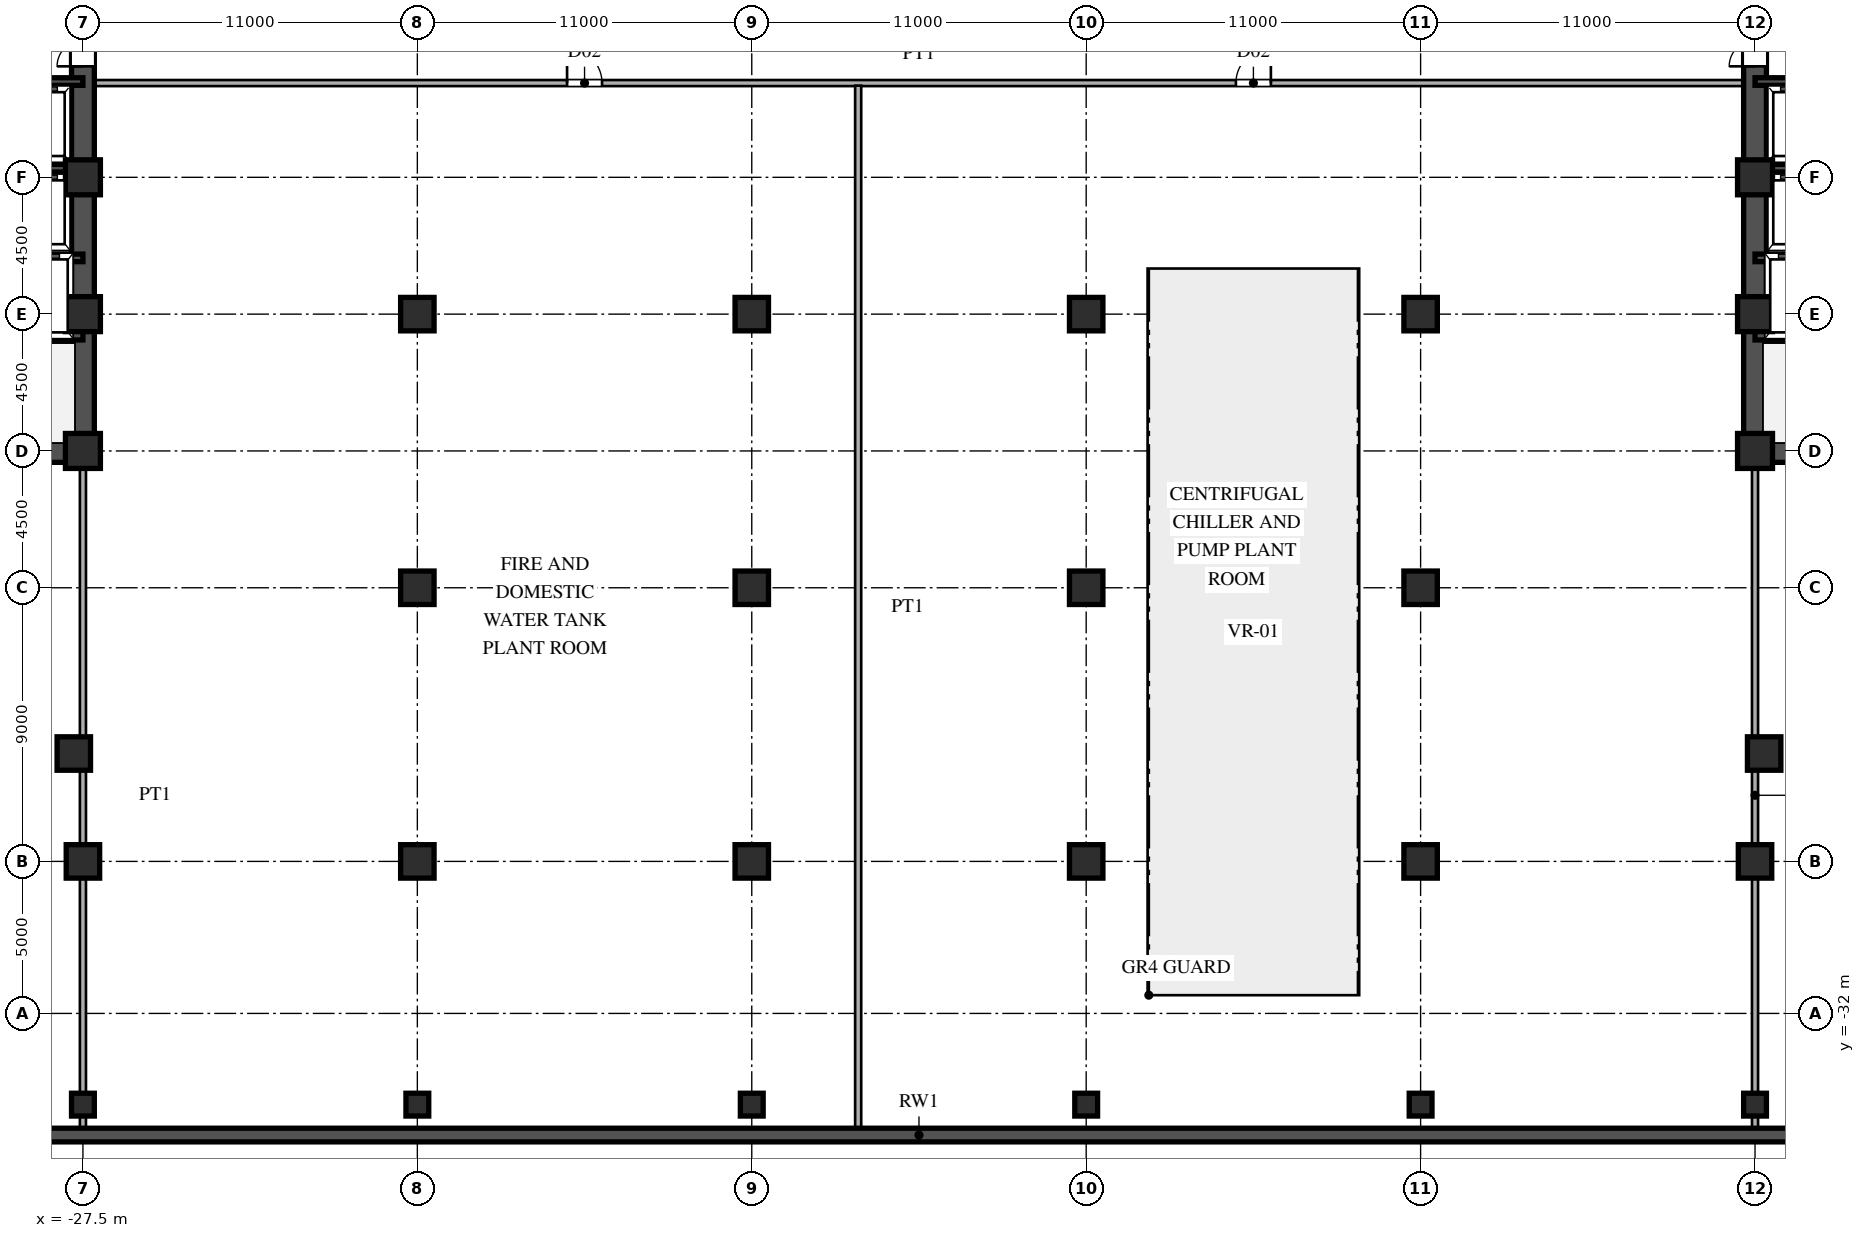
"""IFC4 building model, lengths in metres.
Left out: names, types, materials, properties, quantities, classifications, styles, units other than length and angle.
Written with IfcOpenShell. Run it as: python <this file> out.ifc"""

import sys

from ifc_helpers import new_model, si_unit, direction, frame, frame_2d, origin, origin_2d, place, context, subcontext, project, spatial, rectangle, hollow_rectangle, extrude, source, transform, mapped, element, fill, save


model = new_model("IFC4")
c1 = context("Model", 3, precision=1e-05, world=origin(), true_north=direction((0.0, 1.0)))
c2 = subcontext(c1, "Body", "Model", "MODEL_VIEW")
j1 = project(units=[si_unit("LENGTHUNIT", "METRE"), si_unit("PLANEANGLEUNIT", "RADIAN")], contexts=[c1])
p1 = place(None, origin())
s1 = spatial("IfcSite", under=j1, at=p1, CompositionType="ELEMENT")
p2 = place(p1, origin())
s2 = spatial("IfcBuilding", under=s1, at=p2, CompositionType="ELEMENT")
p3 = place(p2, frame((0.0, 0.0, -9.6)))
s3 = spatial("IfcBuildingStorey", under=s2, at=p3, CompositionType="ELEMENT", Elevation=-9.6)
m1 = source(origin(), c2, "Body", "SweptSolid", [
    extrude(hollow_rectangle(XDim=1.15, YDim=1.15, WallThickness=0.048, at=origin_2d()), origin(), (0.0, 0.0, 1.0), 4.8),
])
for number, where, z_axis, x_axis in (
    (1, (-27.5, -13.5, 0.0), (0.0, 0.0, 1.0), (1.0, 0.0, 0.0)),
    (2, (-27.5, -9.0, 0.0), (0.0, 0.0, 1.0), (1.0, 0.0, 0.0)),
    (3, (-27.5, -4.5, 0.0), (0.0, 0.0, 1.0), (1.0, 0.0, 0.0)),
):
    element("IfcColumn", number, at=place(p3, frame(where, z_axis=z_axis, x_axis=x_axis)), inside=s3, PredefinedType="COLUMN", context=c2, shape_type="MappedRepresentation", body=[
        mapped(m1, transform((0.0, 0.0, 0.0), scale=1.0)),
    ])
m2 = source(origin(), c2, "Body", "SweptSolid", [
    extrude(rectangle(XDim=1.1, YDim=1.1, at=origin_2d()), origin(), (0.0, 0.0, 1.0), 4.8),
])
for number, where, z_axis, x_axis in (
    (4, (-27.5, -27.0, 0.0), (0.0, 0.0, 1.0), (1.0, 0.0, 0.0)),
    (5, (-27.8, -23.451, 0.0), (0.0, 0.0, 1.0), (1.0, 0.0, 0.0)),
):
    element("IfcColumn", number, at=place(p3, frame(where, z_axis=z_axis, x_axis=x_axis)), inside=s3, PredefinedType="COLUMN", context=c2, shape_type="MappedRepresentation", body=[
        mapped(m2, transform((0.0, 0.0, 0.0), scale=1.0)),
    ])
for number, where, z_axis, x_axis in (
    (6, (27.5, -13.5, 0.0), (0.0, 0.0, 1.0), (1.0, 0.0, 0.0)),
    (7, (27.5, -9.0, 0.0), (0.0, 0.0, 1.0), (1.0, 0.0, 0.0)),
    (8, (27.5, -4.5, 0.0), (0.0, 0.0, 1.0), (1.0, 0.0, 0.0)),
):
    element("IfcColumn", number, at=place(p3, frame(where, z_axis=z_axis, x_axis=x_axis)), inside=s3, PredefinedType="COLUMN", context=c2, shape_type="MappedRepresentation", body=[
        mapped(m1, transform((0.0, 0.0, 0.0), scale=1.0)),
    ])
for number, where, z_axis, x_axis in (
    (9, (27.5, -27.0, 0.0), (0.0, 0.0, 1.0), (1.0, 0.0, 0.0)),
    (10, (27.8, -23.451, 0.0), (0.0, 0.0, 1.0), (1.0, 0.0, 0.0)),
    (11, (-16.5, -27.0, 0.0), (0.0, 0.0, 1.0), (1.0, 0.0, 0.0)),
    (12, (-16.5, -18.0, 0.0), (0.0, 0.0, 1.0), (1.0, 0.0, 0.0)),
    (13, (-16.5, -9.0, 0.0), (0.0, 0.0, 1.0), (1.0, 0.0, 0.0)),
    (14, (-5.5, -27.0, 0.0), (0.0, 0.0, 1.0), (1.0, 0.0, 0.0)),
    (15, (-5.5, -18.0, 0.0), (0.0, 0.0, 1.0), (1.0, 0.0, 0.0)),
    (16, (-5.5, -9.0, 0.0), (0.0, 0.0, 1.0), (1.0, 0.0, 0.0)),
    (17, (5.5, -27.0, 0.0), (0.0, 0.0, 1.0), (1.0, 0.0, 0.0)),
    (18, (5.5, -18.0, 0.0), (0.0, 0.0, 1.0), (1.0, 0.0, 0.0)),
    (19, (5.5, -9.0, 0.0), (0.0, 0.0, 1.0), (1.0, 0.0, 0.0)),
    (20, (16.5, -27.0, 0.0), (0.0, 0.0, 1.0), (1.0, 0.0, 0.0)),
    (21, (16.5, -18.0, 0.0), (0.0, 0.0, 1.0), (1.0, 0.0, 0.0)),
    (22, (16.5, -9.0, 0.0), (0.0, 0.0, 1.0), (1.0, 0.0, 0.0)),
):
    element("IfcColumn", number, at=place(p3, frame(where, z_axis=z_axis, x_axis=x_axis)), inside=s3, PredefinedType="COLUMN", context=c2, shape_type="MappedRepresentation", body=[
        mapped(m2, transform((0.0, 0.0, 0.0), scale=1.0)),
    ])
m3 = source(origin(), c2, "Body", "SweptSolid", [
    extrude(rectangle(XDim=0.75, YDim=0.75, at=origin_2d()), origin(), (0.0, 0.0, 1.0), 4.8),
])
for number, where, z_axis, x_axis in (
    (23, (-27.5, -35.0, 0.0), (0.0, 0.0, 1.0), (1.0, 0.0, 0.0)),
    (24, (-16.5, -35.0, 0.0), (0.0, 0.0, 1.0), (1.0, 0.0, 0.0)),
    (25, (-5.5, -35.0, 0.0), (0.0, 0.0, 1.0), (1.0, 0.0, 0.0)),
    (26, (5.5, -35.0, 0.0), (0.0, 0.0, 1.0), (1.0, 0.0, 0.0)),
    (27, (16.5, -35.0, 0.0), (0.0, 0.0, 1.0), (1.0, 0.0, 0.0)),
    (28, (27.5, -35.0, 0.0), (0.0, 0.0, 1.0), (1.0, 0.0, 0.0)),
):
    element("IfcColumn", number, at=place(p3, frame(where, z_axis=z_axis, x_axis=x_axis)), inside=s3, PredefinedType="COLUMN", context=c2, shape_type="MappedRepresentation", body=[
        mapped(m3, transform((0.0, 0.0, 0.0), scale=1.0)),
    ])
p4 = place(p3, frame((-71.96, -36.0, 0.0), z_axis=(0.0, 0.0, 1.0), x_axis=(1.0, 0.0, 0.0)))
e29 = element("IfcWall", 29, at=p4, inside=s3, PredefinedType="USERDEFINED", context=c2, shape_type="SweptSolid", body=[
    extrude(rectangle(XDim=143.92, YDim=0.45, at=frame_2d((71.96, 0.0))), origin(), (0.0, 0.0, 1.0), 4.5),
])
p5 = place(p3, frame((-27.5, -13.5, 0.0), z_axis=(0.0, 0.0, 1.0), x_axis=(0.0, 1.0, 0.0)))
e30 = element("IfcWall", 30, at=p5, inside=s3, PredefinedType="SHEAR", context=c2, shape_type="SweptSolid", body=[
    extrude(rectangle(XDim=12.2, YDim=0.75, at=frame_2d((6.1, 0.0))), origin(), (0.0, 0.0, 1.0), 4.5),
])
p6 = place(p3, frame((-27.5, -1.3, 0.0), z_axis=(0.0, 0.0, 1.0), x_axis=(0.0, 1.0, 0.0)))
e31 = element("IfcWall", 31, at=p6, inside=s3, PredefinedType="SHEAR", context=c2, shape_type="SweptSolid", body=[
    extrude(rectangle(XDim=2.6, YDim=0.75, at=frame_2d((1.3, 0.0))), origin(), (0.0, 0.0, 1.0), 4.5),
])
p7 = place(p6, frame((0.45, 0.0, 0.0)))
e32 = element("IfcOpeningElement", 32, at=p7, cuts=e31, PredefinedType="OPENING", context=c2, shape_type="SweptSolid", body=[
    extrude(rectangle(XDim=1.7, YDim=2.35, at=frame_2d((0.85, 1.175))), frame((0.0, 0.385, 0.0), z_axis=(0.0, -1.0, 0.0), x_axis=(1.0, 0.0, 0.0)), (0.0, 0.0, 1.0), 0.77),
])
p8 = place(p3, frame((-36.5, -13.5, 0.0), z_axis=(0.0, 0.0, 1.0), x_axis=(1.0, 0.0, 0.0)))
e33 = element("IfcWall", 33, at=p8, inside=s3, PredefinedType="SHEAR", context=c2, shape_type="SweptSolid", body=[
    extrude(rectangle(XDim=9.0, YDim=0.75, at=frame_2d((4.5, 0.0))), origin(), (0.0, 0.0, 1.0), 4.5),
])
p9 = place(p3, frame((-36.5, -9.7, 0.0), z_axis=(0.0, 0.0, 1.0), x_axis=(1.0, 0.0, 0.0)))
e34 = element("IfcWall", 34, at=p9, inside=s3, PredefinedType="SHEAR", context=c2, shape_type="SweptSolid", body=[
    extrude(rectangle(XDim=9.0, YDim=0.3, at=frame_2d((4.5, 0.0))), origin(), (0.0, 0.0, 1.0), 4.5),
])
p10 = place(p9, frame((0.6, 0.0, 0.0)))
e35 = element("IfcOpeningElement", 35, at=p10, cuts=e34, PredefinedType="OPENING", context=c2, shape_type="SweptSolid", body=[
    extrude(rectangle(XDim=1.1, YDim=2.2, at=frame_2d((0.55, 1.1))), frame((0.0, 0.16, 0.0), z_axis=(0.0, -1.0, 0.0), x_axis=(1.0, 0.0, 0.0)), (0.0, 0.0, 1.0), 0.32),
])
for number, where, z_axis, x_axis in (
    (36, (-30.3, -7.15, 0.0), (0.0, 0.0, 1.0), (1.0, 0.0, 0.0)),
    (37, (-30.3, -4.2, 0.0), (0.0, 0.0, 1.0), (1.0, 0.0, 0.0)),
    (38, (-30.3, -1.35, 0.0), (0.0, 0.0, 1.0), (1.0, 0.0, 0.0)),
):
    element("IfcWall", number, at=place(p3, frame(where, z_axis=z_axis, x_axis=x_axis)), inside=s3, PredefinedType="SHEAR", context=c2, shape_type="SweptSolid", body=[
        extrude(rectangle(XDim=2.8, YDim=0.25, at=frame_2d((1.4, 0.0))), origin(), (0.0, 0.0, 1.0), 4.5),
    ])
p11 = place(p3, frame((27.5, -13.5, 0.0), z_axis=(0.0, 0.0, 1.0), x_axis=(0.0, 1.0, 0.0)))
e39 = element("IfcWall", 39, at=p11, inside=s3, PredefinedType="SHEAR", context=c2, shape_type="SweptSolid", body=[
    extrude(rectangle(XDim=12.2, YDim=0.75, at=frame_2d((6.1, 0.0))), origin(), (0.0, 0.0, 1.0), 4.5),
])
p12 = place(p3, frame((27.5, -1.3, 0.0), z_axis=(0.0, 0.0, 1.0), x_axis=(0.0, 1.0, 0.0)))
e40 = element("IfcWall", 40, at=p12, inside=s3, PredefinedType="SHEAR", context=c2, shape_type="SweptSolid", body=[
    extrude(rectangle(XDim=2.6, YDim=0.75, at=frame_2d((1.3, 0.0))), origin(), (0.0, 0.0, 1.0), 4.5),
])
p13 = place(p12, frame((0.45, 0.0, 0.0)))
e41 = element("IfcOpeningElement", 41, at=p13, cuts=e40, PredefinedType="OPENING", context=c2, shape_type="SweptSolid", body=[
    extrude(rectangle(XDim=1.7, YDim=2.35, at=frame_2d((0.85, 1.175))), frame((0.0, 0.385, 0.0), z_axis=(0.0, -1.0, 0.0), x_axis=(1.0, 0.0, 0.0)), (0.0, 0.0, 1.0), 0.77),
])
p14 = place(p3, frame((27.5, -13.5, 0.0), z_axis=(0.0, 0.0, 1.0), x_axis=(1.0, 0.0, 0.0)))
e42 = element("IfcWall", 42, at=p14, inside=s3, PredefinedType="SHEAR", context=c2, shape_type="SweptSolid", body=[
    extrude(rectangle(XDim=9.0, YDim=0.75, at=frame_2d((4.5, 0.0))), origin(), (0.0, 0.0, 1.0), 4.5),
])
p15 = place(p3, frame((27.5, -9.7, 0.0), z_axis=(0.0, 0.0, 1.0), x_axis=(1.0, 0.0, 0.0)))
e43 = element("IfcWall", 43, at=p15, inside=s3, PredefinedType="SHEAR", context=c2, shape_type="SweptSolid", body=[
    extrude(rectangle(XDim=9.0, YDim=0.3, at=frame_2d((4.5, 0.0))), origin(), (0.0, 0.0, 1.0), 4.5),
])
p16 = place(p15, frame((7.3, 0.0, 0.0)))
e44 = element("IfcOpeningElement", 44, at=p16, cuts=e43, PredefinedType="OPENING", context=c2, shape_type="SweptSolid", body=[
    extrude(rectangle(XDim=1.1, YDim=2.2, at=frame_2d((0.55, 1.1))), frame((0.0, 0.16, 0.0), z_axis=(0.0, -1.0, 0.0), x_axis=(1.0, 0.0, 0.0)), (0.0, 0.0, 1.0), 0.32),
])
for number, where, z_axis, x_axis in (
    (45, (27.5, -7.15, 0.0), (0.0, 0.0, 1.0), (1.0, 0.0, 0.0)),
    (46, (27.5, -4.2, 0.0), (0.0, 0.0, 1.0), (1.0, 0.0, 0.0)),
    (47, (27.5, -1.35, 0.0), (0.0, 0.0, 1.0), (1.0, 0.0, 0.0)),
):
    element("IfcWall", number, at=place(p3, frame(where, z_axis=z_axis, x_axis=x_axis)), inside=s3, PredefinedType="SHEAR", context=c2, shape_type="SweptSolid", body=[
        extrude(rectangle(XDim=2.8, YDim=0.25, at=frame_2d((1.4, 0.0))), origin(), (0.0, 0.0, 1.0), 4.5),
    ])
p17 = place(p3, frame((-27.12, -1.4, 0.0), z_axis=(0.0, 0.0, 1.0), x_axis=(1.0, 0.0, 0.0)))
e48 = element("IfcWall", 48, at=p17, inside=s3, PredefinedType="PARTITIONING", context=c2, shape_type="SweptSolid", body=[
    extrude(rectangle(XDim=54.24, YDim=0.2, at=frame_2d((27.12, 0.0))), origin(), (0.0, 0.0, 1.0), 4.5),
])
p18 = place(p17, frame((15.545, 0.0, 0.0)))
e49 = element("IfcOpeningElement", 49, at=p18, cuts=e48, PredefinedType="OPENING", context=c2, shape_type="SweptSolid", body=[
    extrude(rectangle(XDim=1.15, YDim=2.2, at=frame_2d((0.575, 1.1))), frame((0.0, 0.11, 0.0), z_axis=(0.0, -1.0, 0.0), x_axis=(1.0, 0.0, 0.0)), (0.0, 0.0, 1.0), 0.22),
])
p19 = place(p17, frame((37.545, 0.0, 0.0)))
e50 = element("IfcOpeningElement", 50, at=p19, cuts=e48, PredefinedType="OPENING", context=c2, shape_type="SweptSolid", body=[
    extrude(rectangle(XDim=1.15, YDim=2.2, at=frame_2d((0.575, 1.1))), frame((0.0, 0.11, 0.0), z_axis=(0.0, -1.0, 0.0), x_axis=(1.0, 0.0, 0.0)), (0.0, 0.0, 1.0), 0.22),
])
p20 = place(p3, frame((-27.5, -35.77, 0.0), z_axis=(0.0, 0.0, 1.0), x_axis=(0.0, 1.0, 0.0)))
e51 = element("IfcWall", 51, at=p20, inside=s3, PredefinedType="PARTITIONING", context=c2, shape_type="SweptSolid", body=[
    extrude(rectangle(XDim=13.958, YDim=0.2, at=frame_2d((6.979, 0.0))), origin(), (0.0, 0.0, 1.0), 4.5),
])
p21 = place(p3, frame((-27.5, -21.812, 0.0), z_axis=(0.0, 0.0, 1.0), x_axis=(0.0, 1.0, 0.0)))
e52 = element("IfcWall", 52, at=p21, inside=s3, PredefinedType="PARTITIONING", context=c2, shape_type="SweptSolid", body=[
    extrude(rectangle(XDim=7.933, YDim=0.2, at=frame_2d((3.966, 0.0))), origin(), (0.0, 0.0, 1.0), 3.912),
])
p22 = place(p3, frame((-2.0, -35.77, 0.0), z_axis=(0.0, 0.0, 1.0), x_axis=(0.0, 1.0, 0.0)))
e53 = element("IfcWall", 53, at=p22, inside=s3, PredefinedType="PARTITIONING", context=c2, shape_type="SweptSolid", body=[
    extrude(rectangle(XDim=34.285, YDim=0.2, at=frame_2d((17.143, 0.0))), origin(), (0.0, 0.0, 1.0), 4.5),
])
p23 = place(p3, frame((27.5, -35.77, 0.0), z_axis=(0.0, 0.0, 1.0), x_axis=(0.0, 1.0, 0.0)))
e54 = element("IfcWall", 54, at=p23, inside=s3, PredefinedType="PARTITIONING", context=c2, shape_type="SweptSolid", body=[
    extrude(rectangle(XDim=13.958, YDim=0.2, at=frame_2d((6.979, 0.0))), origin(), (0.0, 0.0, 1.0), 4.5),
])
p24 = place(p3, frame((27.5, -21.812, 0.0), z_axis=(0.0, 0.0, 1.0), x_axis=(0.0, 1.0, 0.0)))
e55 = element("IfcWall", 55, at=p24, inside=s3, PredefinedType="PARTITIONING", context=c2, shape_type="SweptSolid", body=[
    extrude(rectangle(XDim=7.933, YDim=0.2, at=frame_2d((3.966, 0.0))), origin(), (0.0, 0.0, 1.0), 3.912),
])
m4 = source(origin(), c2, "Body", "SweptSolid", [
    extrude(rectangle(XDim=1.7, YDim=2.35, at=frame_2d((0.85, 1.175))), frame((0.0, 0.025, 0.0), z_axis=(0.0, -1.0, 0.0), x_axis=(1.0, 0.0, 0.0)), (0.0, 0.0, 1.0), 0.05),
])
p25 = place(p7, origin())
e56 = element("IfcDoor", 56, at=p25, inside=s3, OperationType="DOUBLE_SWING_LEFT", PredefinedType="DOOR", context=c2, shape_type="MappedRepresentation", body=[
    mapped(m4, transform((0.0, 0.0, 0.0), scale=1.0)),
])
fill(e32, e56)
p26 = place(p13, origin())
e57 = element("IfcDoor", 57, at=p26, inside=s3, OperationType="DOUBLE_SWING_LEFT", PredefinedType="DOOR", context=c2, shape_type="MappedRepresentation", body=[
    mapped(m4, transform((0.0, 0.0, 0.0), scale=1.0)),
])
fill(e41, e57)
m5 = source(origin(), c2, "Body", "SweptSolid", [
    extrude(rectangle(XDim=1.15, YDim=2.2, at=frame_2d((0.575, 1.1))), frame((0.0, 0.025, 0.0), z_axis=(0.0, -1.0, 0.0), x_axis=(1.0, 0.0, 0.0)), (0.0, 0.0, 1.0), 0.05),
])
p27 = place(p18, origin())
e58 = element("IfcDoor", 58, at=p27, inside=s3, OperationType="SINGLE_SWING_LEFT", PredefinedType="DOOR", context=c2, shape_type="MappedRepresentation", body=[
    mapped(m5, transform((0.0, 0.0, 0.0), scale=1.0)),
])
fill(e49, e58)
p28 = place(p19, origin())
e59 = element("IfcDoor", 59, at=p28, inside=s3, OperationType="SINGLE_SWING_RIGHT", PredefinedType="DOOR", context=c2, shape_type="MappedRepresentation", body=[
    mapped(m5, transform((0.0, 0.0, 0.0), scale=1.0)),
])
fill(e50, e59)
save(model, sys.argv[1])
